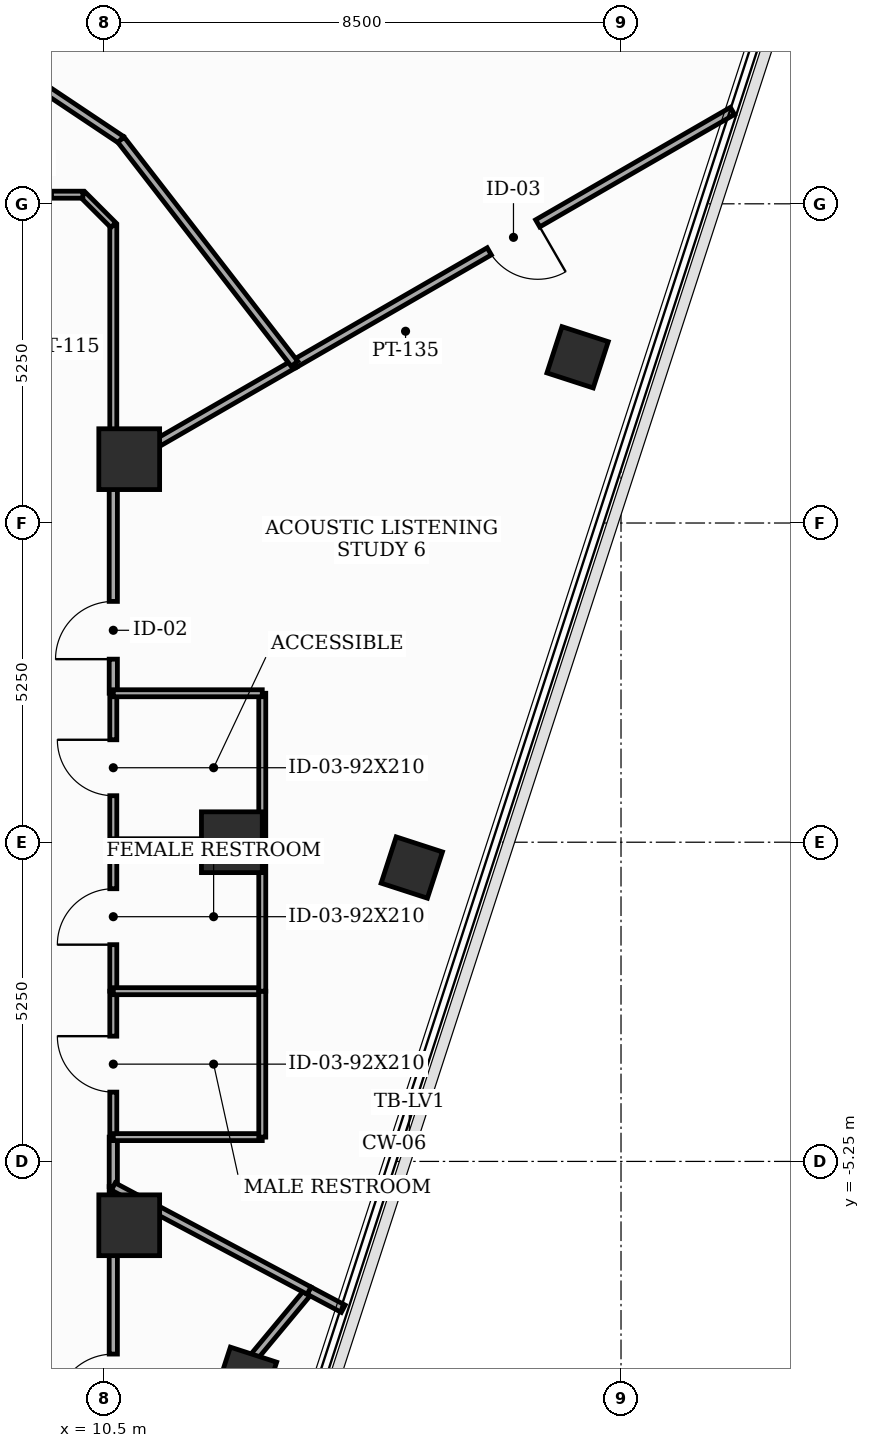
"""IFC4 building model, lengths in metres.
Left out: names, types, materials, properties, quantities, classifications, styles, units other than length and angle.
Written with IfcOpenShell. Run it as: python <this file> out.ifc"""

import sys

from ifc_helpers import new_model, si_unit, direction, frame, frame_2d, origin, origin_2d, place, context, subcontext, project, spatial, rectangle, extrude, element, fill, save


model = new_model("IFC4")
c1 = context("Model", 3, precision=1e-05, world=origin(), true_north=direction((0.0, 1.0)))
c2 = subcontext(c1, "Body", "Model", "MODEL_VIEW")
j1 = project(units=[si_unit("LENGTHUNIT", "METRE"), si_unit("PLANEANGLEUNIT", "RADIAN")], contexts=[c1])
p1 = place(None, origin())
s1 = spatial("IfcSite", under=j1, at=p1, CompositionType="ELEMENT")
p2 = place(p1, origin())
s2 = spatial("IfcBuilding", under=s1, at=p2, CompositionType="ELEMENT")
p3 = place(p2, frame((0.0, 0.0, 309.1)))
s3 = spatial("IfcBuildingStorey", under=s2, at=p3, CompositionType="ELEMENT", Elevation=309.1)
for number, where, z_axis, x_axis in (
    (1, (12.6, 0.0, 0.0), (0.0, 0.0, 1.0), (1.0, 0.0, 0.0)),
    (2, (10.912, 6.3, 0.0), (0.0, 0.0, 1.0), (1.0, 0.0, 0.0)),
    (3, (10.912, -6.3, 0.0), (0.0, 0.0, 1.0), (1.0, 0.0, 0.0)),
):
    element("IfcColumn", number, at=place(p3, frame(where, z_axis=z_axis, x_axis=x_axis)), inside=s3, PredefinedType="COLUMN", context=c2, shape_type="SweptSolid", body=[
        extrude(rectangle(XDim=1.0, YDim=1.0, at=origin_2d()), origin(), (0.0, 0.0, 1.0), 3.7),
    ])
for number, where, z_axis, x_axis in (
    (4, (12.833, -8.809, 0.0), (0.0, 0.0, 1.0), (0.309, 0.951, 0.0)),
    (5, (15.559, -0.417, 0.0), (0.0, 0.0, 1.0), (0.309, 0.951, 0.0)),
    (6, (18.286, 7.976, 0.0), (0.0, 0.0, 1.0), (0.309, 0.951, 0.0)),
):
    element("IfcColumn", number, at=place(p3, frame(where, z_axis=z_axis, x_axis=x_axis)), inside=s3, PredefinedType="COLUMN", context=c2, shape_type="SweptSolid", body=[
        extrude(rectangle(XDim=0.8, YDim=0.8, at=origin_2d()), origin(), (0.0, 0.0, 1.0), 3.7),
    ])
p4 = place(p3, frame((10.65, -10.15, 0.0), z_axis=(0.0, 0.0, 1.0), x_axis=(0.0, 1.0, 0.0)))
e7 = element("IfcWall", 7, at=p4, inside=s3, PredefinedType="PARTITIONING", context=c2, shape_type="SweptSolid", body=[
    extrude(rectangle(XDim=4.487, YDim=0.135, at=frame_2d((2.243, 0.0))), origin(), (0.0, 0.0, 1.0), 2.04),
])
p5 = place(p4, frame((0.781, 0.0, 0.0)))
e8 = element("IfcOpeningElement", 8, at=p5, cuts=e7, PredefinedType="OPENING", context=c2, shape_type="SweptSolid", body=[
    extrude(rectangle(XDim=0.95, YDim=2.0, at=frame_2d((0.475, 1.0))), frame((0.0, 0.077, 0.0), z_axis=(0.0, -1.0, 0.0), x_axis=(1.0, 0.0, 0.0)), (0.0, 0.0, 1.0), 0.155),
])
p6 = place(p3, frame((10.65, -4.85, 0.0), z_axis=(0.0, 0.0, 1.0), x_axis=(0.0, 1.0, 0.0)))
e9 = element("IfcWall", 9, at=p6, inside=s3, PredefinedType="PARTITIONING", context=c2, shape_type="SweptSolid", body=[
    extrude(rectangle(XDim=2.4, YDim=0.115, at=frame_2d((1.2, 0.0))), origin(), (0.0, 0.0, 1.0), 3.44),
])
p7 = place(p6, frame((0.74, 0.0, 0.0)))
e10 = element("IfcOpeningElement", 10, at=p7, cuts=e9, PredefinedType="OPENING", context=c2, shape_type="SweptSolid", body=[
    extrude(rectangle(XDim=0.92, YDim=2.1, at=frame_2d((0.46, 1.05))), frame((0.0, 0.067, 0.0), z_axis=(0.0, -1.0, 0.0), x_axis=(1.0, 0.0, 0.0)), (0.0, 0.0, 1.0), 0.135),
])
p8 = place(p3, frame((10.65, -2.45, 0.0), z_axis=(0.0, 0.0, 1.0), x_axis=(0.0, 1.0, 0.0)))
e11 = element("IfcWall", 11, at=p8, inside=s3, PredefinedType="PARTITIONING", context=c2, shape_type="SweptSolid", body=[
    extrude(rectangle(XDim=2.45, YDim=0.115, at=frame_2d((1.225, 0.0))), origin(), (0.0, 0.0, 1.0), 2.825),
])
p9 = place(p8, frame((0.765, 0.0, 0.0)))
e12 = element("IfcOpeningElement", 12, at=p9, cuts=e11, PredefinedType="OPENING", context=c2, shape_type="SweptSolid", body=[
    extrude(rectangle(XDim=0.92, YDim=2.1, at=frame_2d((0.46, 1.05))), frame((0.0, 0.067, 0.0), z_axis=(0.0, -1.0, 0.0), x_axis=(1.0, 0.0, 0.0)), (0.0, 0.0, 1.0), 0.135),
])
p10 = place(p3, frame((10.65, 0.0, 0.0), z_axis=(0.0, 0.0, 1.0), x_axis=(0.0, 1.0, 0.0)))
e13 = element("IfcWall", 13, at=p10, inside=s3, PredefinedType="PARTITIONING", context=c2, shape_type="SweptSolid", body=[
    extrude(rectangle(XDim=2.45, YDim=0.115, at=frame_2d((1.225, 0.0))), origin(), (0.0, 0.0, 1.0), 2.825),
])
p11 = place(p10, frame((0.765, 0.0, 0.0)))
e14 = element("IfcOpeningElement", 14, at=p11, cuts=e13, PredefinedType="OPENING", context=c2, shape_type="SweptSolid", body=[
    extrude(rectangle(XDim=0.92, YDim=2.1, at=frame_2d((0.46, 1.05))), frame((0.0, 0.067, 0.0), z_axis=(0.0, -1.0, 0.0), x_axis=(1.0, 0.0, 0.0)), (0.0, 0.0, 1.0), 0.135),
])
p12 = place(p3, frame((10.65, -5.663, 0.0), z_axis=(0.0, 0.0, 1.0), x_axis=(0.0, 1.0, 0.0)))
e15 = element("IfcWall", 15, at=p12, inside=s3, PredefinedType="PARTITIONING", context=c2, shape_type="SweptSolid", body=[
    extrude(rectangle(XDim=0.813, YDim=0.135, at=frame_2d((0.406, 0.0))), origin(), (0.0, 0.0, 1.0), 3.44),
])
p13 = place(p3, frame((10.65, 2.45, 0.0), z_axis=(0.0, 0.0, 1.0), x_axis=(0.0, 1.0, 0.0)))
e16 = element("IfcWall", 16, at=p13, inside=s3, PredefinedType="PARTITIONING", context=c2, shape_type="SweptSolid", body=[
    extrude(rectangle(XDim=3.699, YDim=0.135, at=frame_2d((1.85, 0.0))), origin(), (0.0, 0.0, 1.0), 2.04),
])
p14 = place(p13, frame((0.561, 0.0, 0.0)))
e17 = element("IfcOpeningElement", 17, at=p14, cuts=e16, PredefinedType="OPENING", context=c2, shape_type="SweptSolid", body=[
    extrude(rectangle(XDim=0.95, YDim=2.0, at=frame_2d((0.475, 1.0))), frame((0.0, 0.077, 0.0), z_axis=(0.0, -1.0, 0.0), x_axis=(1.0, 0.0, 0.0)), (0.0, 0.0, 1.0), 0.155),
])
p15 = place(p3, frame((10.65, 6.149, 0.0), z_axis=(0.0, 0.0, 1.0), x_axis=(0.0, 1.0, 0.0)))
e18 = element("IfcWall", 18, at=p15, inside=s3, PredefinedType="PARTITIONING", context=c2, shape_type="SweptSolid", body=[
    extrude(rectangle(XDim=4.001, YDim=0.115, at=frame_2d((2.0, 0.0))), origin(), (0.0, 0.0, 1.0), 2.04),
])
p16 = place(p3, frame((10.65, 10.15, 0.0), z_axis=(0.0, 0.0, 1.0), x_axis=(-0.707106781187, 0.707106781187, 0.0)))
e19 = element("IfcWall", 19, at=p16, inside=s3, PredefinedType="PARTITIONING", context=c2, shape_type="SweptSolid", body=[
    extrude(rectangle(XDim=0.707, YDim=0.115, at=frame_2d((0.354, 0.0))), origin(), (0.0, 0.0, 1.0), 3.44),
])
p17 = place(p3, frame((10.15, 10.65, 0.0), z_axis=(0.0, 0.0, 1.0), x_axis=(-1.0, 0.0, 0.0)))
e20 = element("IfcWall", 20, at=p17, inside=s3, PredefinedType="PARTITIONING", context=c2, shape_type="SweptSolid", body=[
    extrude(rectangle(XDim=4.956, YDim=0.115, at=frame_2d((2.478, 0.0))), origin(), (0.0, 0.0, 1.0), 2.04),
])
p18 = place(p17, frame((0.516, 0.0, 0.0)))
e21 = element("IfcOpeningElement", 21, at=p18, cuts=e20, PredefinedType="OPENING", context=c2, shape_type="SweptSolid", body=[
    extrude(rectangle(XDim=0.95, YDim=2.0, at=frame_2d((0.475, 1.0))), frame((0.0, 0.067, 0.0), z_axis=(0.0, -1.0, 0.0), x_axis=(1.0, 0.0, 0.0)), (0.0, 0.0, 1.0), 0.135),
])
p19 = place(p3, frame((13.87, -7.375, 0.0), z_axis=(0.0, 0.0, 1.0), x_axis=(-0.63949044568, -0.768799043888, 0.0)))
e22 = element("IfcWall", 22, at=p19, inside=s3, PredefinedType="PARTITIONING", context=c2, shape_type="SweptSolid", body=[
    extrude(rectangle(XDim=6.82, YDim=0.135, at=frame_2d((3.41, 0.0))), origin(), (0.0, 0.0, 1.0), 2.03),
])
p20 = place(p3, frame((14.432, -7.673, 0.0), z_axis=(0.0, 0.0, 1.0), x_axis=(-0.88341392232, 0.468593471839, 0.0)))
e23 = element("IfcWall", 23, at=p20, inside=s3, PredefinedType="PARTITIONING", context=c2, shape_type="SweptSolid", body=[
    extrude(rectangle(XDim=0.636, YDim=0.135, at=frame_2d((0.318, 0.0))), origin(), (0.0, 0.0, 1.0), 3.44),
])
p21 = place(p3, frame((13.87, -7.375, 0.0), z_axis=(0.0, 0.0, 1.0), x_axis=(-0.882982204984, 0.469406461057, 0.0)))
e24 = element("IfcWall", 24, at=p21, inside=s3, PredefinedType="PARTITIONING", context=c2, shape_type="SweptSolid", body=[
    extrude(rectangle(XDim=3.647, YDim=0.135, at=frame_2d((1.823, 0.0))), origin(), (0.0, 0.0, 1.0), 2.04),
])
for number, where, z_axis, x_axis in (
    (25, (13.1, -2.45, 0.0), (0.0, 0.0, 1.0), (-1.0, 0.0, 0.0)),
    (26, (10.65, -4.85, 0.0), (0.0, 0.0, 1.0), (1.0, 0.0, 0.0)),
):
    element("IfcWall", number, at=place(p3, frame(where, z_axis=z_axis, x_axis=x_axis)), inside=s3, PredefinedType="PARTITIONING", context=c2, shape_type="SweptSolid", body=[
        extrude(rectangle(XDim=2.45, YDim=0.115, at=frame_2d((1.225, 0.0))), origin(), (0.0, 0.0, 1.0), 2.04),
    ])
p22 = place(p3, frame((13.1, -4.85, 0.0), z_axis=(0.0, 0.0, 1.0), x_axis=(0.0, 1.0, 0.0)))
e27 = element("IfcWall", 27, at=p22, inside=s3, PredefinedType="PARTITIONING", context=c2, shape_type="SweptSolid", body=[
    extrude(rectangle(XDim=2.4, YDim=0.115, at=frame_2d((1.2, 0.0))), origin(), (0.0, 0.0, 1.0), 2.04),
])
p23 = place(p3, frame((13.1, 0.0, 0.0), z_axis=(0.0, 0.0, 1.0), x_axis=(-1.0, 0.0, 0.0)))
e28 = element("IfcWall", 28, at=p23, inside=s3, PredefinedType="PARTITIONING", context=c2, shape_type="SweptSolid", body=[
    extrude(rectangle(XDim=2.45, YDim=0.115, at=frame_2d((1.225, 0.0))), origin(), (0.0, 0.0, 1.0), 2.03),
])
for number, where, z_axis, x_axis in (
    (29, (13.1, -2.45, 0.0), (0.0, 0.0, 1.0), (0.0, 1.0, 0.0)),
    (30, (13.1, 0.0, 0.0), (0.0, 0.0, 1.0), (0.0, 1.0, 0.0)),
):
    element("IfcWall", number, at=place(p3, frame(where, z_axis=z_axis, x_axis=x_axis)), inside=s3, PredefinedType="PARTITIONING", context=c2, shape_type="SweptSolid", body=[
        extrude(rectangle(XDim=2.45, YDim=0.115, at=frame_2d((1.225, 0.0))), origin(), (0.0, 0.0, 1.0), 2.04),
    ])
p24 = place(p3, frame((13.1, 2.45, 0.0), z_axis=(0.0, 0.0, 1.0), x_axis=(-1.0, 0.0, 0.0)))
e31 = element("IfcWall", 31, at=p24, inside=s3, PredefinedType="PARTITIONING", context=c2, shape_type="SweptSolid", body=[
    extrude(rectangle(XDim=2.45, YDim=0.115, at=frame_2d((1.225, 0.0))), origin(), (0.0, 0.0, 1.0), 2.04),
])
p25 = place(p3, frame((20.833, 12.028, 0.0), z_axis=(0.0, 0.0, 1.0), x_axis=(-0.866007163819, -0.500031591216, 0.0)))
e32 = element("IfcWall", 32, at=p25, inside=s3, PredefinedType="PARTITIONING", context=c2, shape_type="SweptSolid", body=[
    extrude(rectangle(XDim=8.317, YDim=0.135, at=frame_2d((4.159, 0.0))), origin(), (0.0, 0.0, 1.0), 2.04),
])
p26 = place(p25, frame((3.698, 0.0, 0.0)))
e33 = element("IfcOpeningElement", 33, at=p26, cuts=e32, PredefinedType="OPENING", context=c2, shape_type="SweptSolid", body=[
    extrude(rectangle(XDim=0.92, YDim=2.0, at=frame_2d((0.46, 1.0))), frame((0.0, 0.077, 0.0), z_axis=(0.0, -1.0, 0.0), x_axis=(1.0, 0.0, 0.0)), (0.0, 0.0, 1.0), 0.155),
])
p27 = place(p3, frame((13.63, 7.869, 0.0), z_axis=(0.0, 0.0, 1.0), x_axis=(-0.866091067331, -0.499886250151, 0.0)))
e34 = element("IfcWall", 34, at=p27, inside=s3, PredefinedType="PARTITIONING", context=c2, shape_type="SweptSolid", body=[
    extrude(rectangle(XDim=3.441, YDim=0.135, at=frame_2d((1.72, 0.0))), origin(), (0.0, 0.0, 1.0), 2.04),
])
p28 = place(p3, frame((6.899, 14.145, 0.0), z_axis=(0.0, 0.0, 1.0), x_axis=(0.831510168033, -0.555509532283, 0.0)))
e35 = element("IfcWall", 35, at=p28, inside=s3, PredefinedType="PARTITIONING", context=c2, shape_type="SweptSolid", body=[
    extrude(rectangle(XDim=4.663, YDim=0.135, at=frame_2d((2.331, 0.0))), origin(), (0.0, 0.0, 1.0), 2.04),
])
p29 = place(p3, frame((10.776, 11.555, 0.0), z_axis=(0.0, 0.0, 1.0), x_axis=(0.612213330569, -0.790692631731, 0.0)))
e36 = element("IfcWall", 36, at=p29, inside=s3, PredefinedType="PARTITIONING", context=c2, shape_type="SweptSolid", body=[
    extrude(rectangle(XDim=4.662, YDim=0.135, at=frame_2d((2.331, 0.0))), origin(), (0.0, 0.0, 1.0), 3.44),
])
p30 = place(p5, origin())
e37 = element("IfcDoor", 37, at=p30, inside=s3, OperationType="SINGLE_SWING_LEFT", PredefinedType="DOOR", context=c2, shape_type="SweptSolid", body=[
    extrude(rectangle(XDim=0.95, YDim=2.0, at=frame_2d((0.475, 1.0))), frame((0.0, 0.025, 0.0), z_axis=(0.0, -1.0, 0.0), x_axis=(1.0, 0.0, 0.0)), (0.0, 0.0, 1.0), 0.05),
])
fill(e8, e37)
p31 = place(p7, origin())
e38 = element("IfcDoor", 38, at=p31, inside=s3, OperationType="SINGLE_SWING_RIGHT", PredefinedType="DOOR", context=c2, shape_type="SweptSolid", body=[
    extrude(rectangle(XDim=0.92, YDim=2.1, at=frame_2d((0.46, 1.05))), frame((0.0, 0.025, 0.0), z_axis=(0.0, -1.0, 0.0), x_axis=(1.0, 0.0, 0.0)), (0.0, 0.0, 1.0), 0.05),
])
fill(e10, e38)
p32 = place(p9, origin())
e39 = element("IfcDoor", 39, at=p32, inside=s3, OperationType="SINGLE_SWING_LEFT", PredefinedType="DOOR", context=c2, shape_type="SweptSolid", body=[
    extrude(rectangle(XDim=0.92, YDim=2.1, at=frame_2d((0.46, 1.05))), frame((0.0, 0.025, 0.0), z_axis=(0.0, -1.0, 0.0), x_axis=(1.0, 0.0, 0.0)), (0.0, 0.0, 1.0), 0.05),
])
fill(e12, e39)
p33 = place(p11, origin())
e40 = element("IfcDoor", 40, at=p33, inside=s3, OperationType="SINGLE_SWING_RIGHT", PredefinedType="DOOR", context=c2, shape_type="SweptSolid", body=[
    extrude(rectangle(XDim=0.92, YDim=2.1, at=frame_2d((0.46, 1.05))), frame((0.0, 0.025, 0.0), z_axis=(0.0, -1.0, 0.0), x_axis=(1.0, 0.0, 0.0)), (0.0, 0.0, 1.0), 0.05),
])
fill(e14, e40)
p34 = place(p14, origin())
e41 = element("IfcDoor", 41, at=p34, inside=s3, OperationType="SINGLE_SWING_LEFT", PredefinedType="DOOR", context=c2, shape_type="SweptSolid", body=[
    extrude(rectangle(XDim=0.95, YDim=2.0, at=frame_2d((0.475, 1.0))), frame((0.0, 0.025, 0.0), z_axis=(0.0, -1.0, 0.0), x_axis=(1.0, 0.0, 0.0)), (0.0, 0.0, 1.0), 0.05),
])
fill(e17, e41)
p35 = place(p26, origin())
e42 = element("IfcDoor", 42, at=p35, inside=s3, OperationType="SINGLE_SWING_LEFT", PredefinedType="DOOR", context=c2, shape_type="SweptSolid", body=[
    extrude(rectangle(XDim=0.92, YDim=2.0, at=frame_2d((0.46, 1.0))), frame((0.0, 0.025, 0.0), z_axis=(0.0, -1.0, 0.0), x_axis=(1.0, 0.0, 0.0)), (0.0, 0.0, 1.0), 0.05),
])
fill(e33, e42)
save(model, sys.argv[1])
